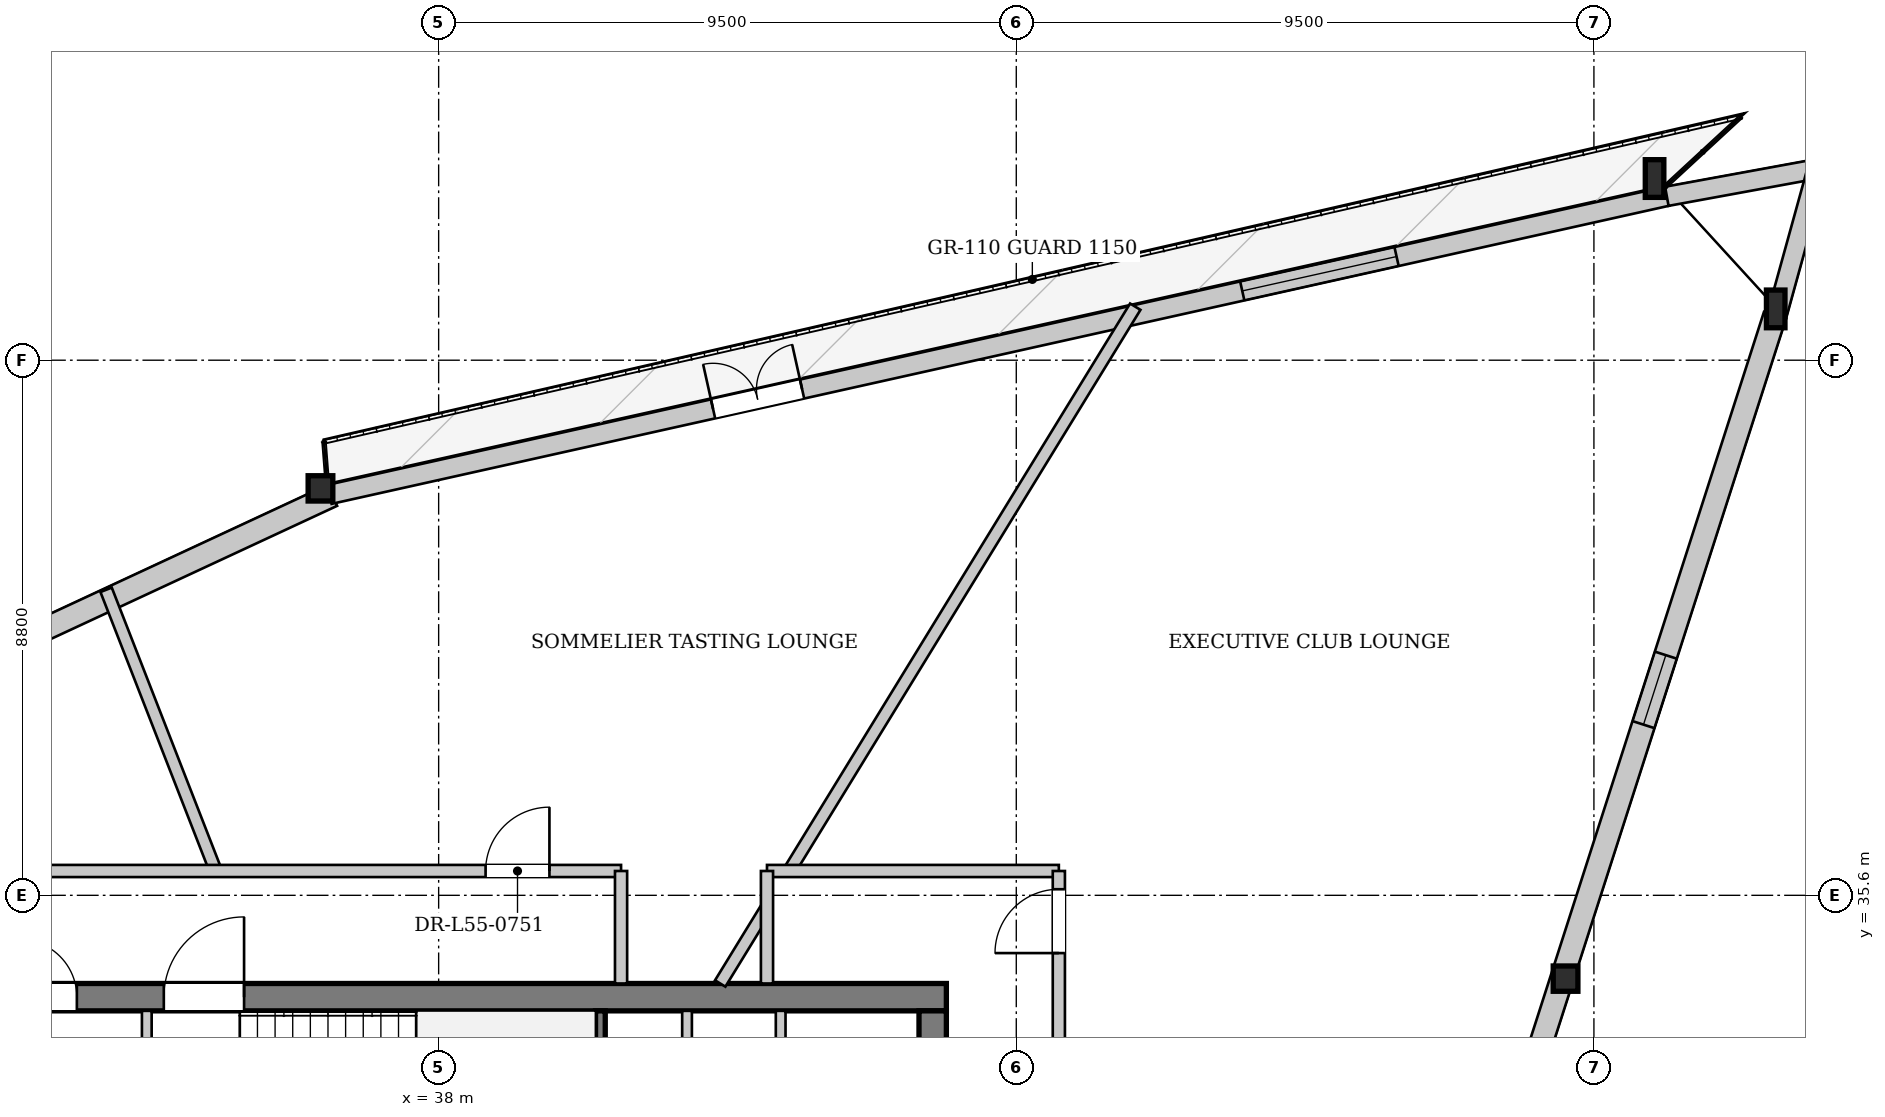
"""IFC4 building model, lengths in metres.
Left out: names, types, materials, properties, quantities, classifications, styles, units other than length and angle.
Written with IfcOpenShell. Run it as: python <this file> out.ifc"""

import sys

from ifc_helpers import new_model, si_unit, direction, frame, frame_2d, origin, origin_2d, place, context, subcontext, project, spatial, rectangle, i_section, extrude, source, transform, mapped, element, fill, save


model = new_model("IFC4")
c1 = context("Model", 3, precision=1e-05, world=origin(), true_north=direction((0.0, 1.0)))
c2 = subcontext(c1, "Body", "Model", "MODEL_VIEW")
j1 = project(units=[si_unit("LENGTHUNIT", "METRE"), si_unit("PLANEANGLEUNIT", "RADIAN")], contexts=[c1])
p1 = place(None, origin())
s1 = spatial("IfcSite", under=j1, at=p1, CompositionType="ELEMENT")
p2 = place(p1, origin())
s2 = spatial("IfcBuilding", under=s1, at=p2, CompositionType="ELEMENT")
p3 = place(p2, frame((0.0, 0.0, 209.6)))
s3 = spatial("IfcBuildingStorey", under=s2, at=p3, CompositionType="ELEMENT", Elevation=209.6)
m1 = source(origin(), c2, "Body", "SweptSolid", [
    extrude(i_section(OverallWidth=0.305, OverallDepth=0.62, WebThickness=0.021, FlangeThickness=0.04, at=origin_2d()), origin(), (0.0, 0.0, 1.0), 3.418),
])
p4 = place(p3, frame((60.159, 45.079, 0.0), z_axis=(-0.098864511312, 0.096292891076, 0.990430960507), x_axis=(-0.69772854898, -0.716362249101, 0.0)))
e1 = element("IfcColumn", 1, at=p4, inside=s3, PredefinedType="COLUMN", context=c2, shape_type="MappedRepresentation", body=[
    mapped(m1, transform((0.0, 0.0, 0.0), x_axis=(1.0, 0.0, 0.0), y_axis=(0.0, 1.0, 0.0), z_axis=(0.0, 0.0, 1.0), scale=1.0)),
])
m2 = source(origin(), c2, "Body", "SweptSolid", [
    extrude(i_section(OverallWidth=0.305, OverallDepth=0.62, WebThickness=0.021, FlangeThickness=0.04, at=origin_2d()), origin(), (0.0, 0.0, 1.0), 3.413),
])
p5 = place(p3, frame((58.17, 47.253, 0.0), z_axis=(-0.101281359539, 0.07903665416, 0.991713312157), x_axis=(-0.615211782312, -0.78836188575, 0.0)))
e2 = element("IfcColumn", 2, at=p5, inside=s3, PredefinedType="COLUMN", context=c2, shape_type="MappedRepresentation", body=[
    mapped(m2, transform((0.0, 0.0, 0.0), x_axis=(1.0, 0.0, 0.0), y_axis=(0.0, 1.0, 0.0), z_axis=(0.0, 0.0, 1.0), scale=1.0)),
])
m3 = source(origin(), c2, "Body", "SweptSolid", [
    extrude(i_section(OverallWidth=0.406, OverallDepth=0.416, WebThickness=0.027, FlangeThickness=0.042, at=origin_2d()), origin(), (0.0, 0.0, 1.0), 3.395),
])
p6 = place(p3, frame((36.17, 42.35, 0.0), z_axis=(-0.06681514078, -0.033803139038, 0.997192601634), x_axis=(0.451434801381, -0.892304107411, 0.0)))
e3 = element("IfcColumn", 3, at=p6, inside=s3, PredefinedType="COLUMN", context=c2, shape_type="MappedRepresentation", body=[
    mapped(m3, transform((0.0, 0.0, 0.0), x_axis=(1.0, 0.0, 0.0), y_axis=(0.0, 1.0, 0.0), z_axis=(0.0, 0.0, 1.0), scale=1.0)),
])
m4 = source(origin(), c2, "Body", "SweptSolid", [
    extrude(i_section(OverallWidth=0.406, OverallDepth=0.416, WebThickness=0.027, FlangeThickness=0.042, at=origin_2d()), origin(), (0.0, 0.0, 1.0), 3.403),
])
p7 = place(p3, frame((56.625, 34.082, 0.0), z_axis=(-0.053880341029, 0.087098181103, 0.994741582372), x_axis=(-0.85042932519, -0.526089310723, 0.0)))
e4 = element("IfcColumn", 4, at=p7, inside=s3, PredefinedType="COLUMN", context=c2, shape_type="MappedRepresentation", body=[
    mapped(m4, transform((0.0, 0.0, 0.0), x_axis=(1.0, 0.0, 0.0), y_axis=(0.0, 1.0, 0.0), z_axis=(0.0, 0.0, 1.0), scale=1.0)),
])
p8 = place(p3, frame((15.812, 32.672, 0.0), z_axis=(0.0, 0.0, 1.0), x_axis=(0.906732766682, 0.421705691003, 0.0)))
e5 = element("IfcWall", 5, at=p8, inside=s3, PredefinedType="SOLIDWALL", context=c2, shape_type="SweptSolid", body=[
    extrude(rectangle(XDim=22.54, YDim=0.38, at=frame_2d((11.27, 0.0))), origin(), (0.0, 0.0, 1.0), 2.822),
])
p9 = place(p8, frame((5.711, 0.0, 0.65)))
e6 = element("IfcOpeningElement", 6, at=p9, cuts=e5, PredefinedType="OPENING", context=c2, shape_type="SweptSolid", body=[
    extrude(rectangle(XDim=1.2, YDim=1.5, at=frame_2d((0.6, 0.75))), frame((0.0, 0.2, 0.0), z_axis=(0.0, -1.0, 0.0), x_axis=(1.0, 0.0, 0.0)), (0.0, 0.0, 1.0), 0.4),
])
p10 = place(p8, frame((15.629, 0.0, 0.65)))
e7 = element("IfcOpeningElement", 7, at=p10, cuts=e5, PredefinedType="OPENING", context=c2, shape_type="SweptSolid", body=[
    extrude(rectangle(XDim=1.2, YDim=1.5, at=frame_2d((0.6, 0.75))), frame((0.0, 0.2, 0.0), z_axis=(0.0, -1.0, 0.0), x_axis=(1.0, 0.0, 0.0)), (0.0, 0.0, 1.0), 0.4),
])
p11 = place(p3, frame((36.205, 42.193, 0.0), z_axis=(0.0, 0.0, 1.0), x_axis=(0.976051796761, 0.217538249599, 0.0)))
e8 = element("IfcWall", 8, at=p11, inside=s3, PredefinedType="SOLIDWALL", context=c2, shape_type="SweptSolid", body=[
    extrude(rectangle(XDim=22.54, YDim=0.32, at=frame_2d((11.27, 0.0))), origin(), (0.0, 0.0, 1.0), 2.822),
])
p12 = place(p11, frame((6.463, 0.0, 0.0)))
e9 = element("IfcOpeningElement", 9, at=p12, cuts=e8, PredefinedType="OPENING", context=c2, shape_type="SweptSolid", body=[
    extrude(rectangle(XDim=1.5, YDim=2.3, at=frame_2d((0.75, 1.15))), frame((0.0, 0.17, 0.0), z_axis=(0.0, -1.0, 0.0), x_axis=(1.0, 0.0, 0.0)), (0.0, 0.0, 1.0), 0.34),
])
p13 = place(p11, frame((15.38, 0.0, 0.352)))
e10 = element("IfcOpeningElement", 10, at=p13, cuts=e8, PredefinedType="OPENING", context=c2, shape_type="SweptSolid", body=[
    extrude(rectangle(XDim=2.6, YDim=2.35, at=frame_2d((1.3, 1.175))), frame((0.0, 0.17, 0.0), z_axis=(0.0, -1.0, 0.0), x_axis=(1.0, 0.0, 0.0)), (0.0, 0.0, 1.0), 0.34),
])
for number, where, z_axis, x_axis in (
    (11, (58.199, 47.096, 0.0), (0.0, 0.0, 1.0), (0.984, 0.18, 0.0)),
    (12, (60.744, 47.795, 0.0), (0.0, 0.0, 1.0), (-0.267, -0.964, 0.0)),
):
    element("IfcWall", number, at=place(p3, frame(where, z_axis=z_axis, x_axis=x_axis)), inside=s3, PredefinedType="SOLIDWALL", context=c2, shape_type="SweptSolid", body=[
        extrude(rectangle(XDim=2.774, YDim=0.32, at=frame_2d((1.387, 0.0))), origin(), (0.0, 0.0, 1.0), 2.822),
    ])
p14 = place(p3, frame((59.978, 45.137, 0.0), z_axis=(0.0, 0.0, 1.0), x_axis=(-0.305908606636, -0.95206088271, 0.0)))
e13 = element("IfcWall", 13, at=p14, inside=s3, PredefinedType="SOLIDWALL", context=c2, shape_type="SweptSolid", body=[
    extrude(rectangle(XDim=23.102, YDim=0.38, at=frame_2d((11.551, 0.0))), origin(), (0.0, 0.0, 1.0), 2.822),
])
p15 = place(p14, frame((5.869, 0.0, 0.65)))
e14 = element("IfcOpeningElement", 14, at=p15, cuts=e13, PredefinedType="OPENING", context=c2, shape_type="SweptSolid", body=[
    extrude(rectangle(XDim=1.2, YDim=1.5, at=frame_2d((0.6, 0.75))), frame((0.0, 0.2, 0.0), z_axis=(0.0, -1.0, 0.0), x_axis=(1.0, 0.0, 0.0)), (0.0, 0.0, 1.0), 0.4),
])
p16 = place(p14, frame((16.034, 0.0, 0.65)))
e15 = element("IfcOpeningElement", 15, at=p16, cuts=e13, PredefinedType="OPENING", context=c2, shape_type="SweptSolid", body=[
    extrude(rectangle(XDim=1.2, YDim=1.5, at=frame_2d((0.6, 0.75))), frame((0.0, 0.2, 0.0), z_axis=(0.0, -1.0, 0.0), x_axis=(1.0, 0.0, 0.0)), (0.0, 0.0, 1.0), 0.4),
])
p17 = place(p3, frame((29.65, 33.925, 0.0), z_axis=(0.0, 0.0, 1.0), x_axis=(1.0, 0.0, 0.0)))
e16 = element("IfcWall", 16, at=p17, inside=s3, PredefinedType="SHEAR", context=c2, shape_type="SweptSolid", body=[
    extrude(rectangle(XDim=16.7, YDim=0.45, at=frame_2d((8.35, 0.0))), origin(), (0.0, 0.0, 1.0), 3.33),
])
p18 = place(p17, frame((1.45, 0.0, 0.0)))
e17 = element("IfcOpeningElement", 17, at=p18, cuts=e16, PredefinedType="OPENING", context=c2, shape_type="SweptSolid", body=[
    extrude(rectangle(XDim=0.95, YDim=2.1, at=frame_2d((0.475, 1.05))), frame((0.0, 0.235, 0.0), z_axis=(0.0, -1.0, 0.0), x_axis=(1.0, 0.0, 0.0)), (0.0, 0.0, 1.0), 0.47),
])
p19 = place(p17, frame((3.83, 0.0, 0.0)))
e18 = element("IfcOpeningElement", 18, at=p19, cuts=e16, PredefinedType="OPENING", context=c2, shape_type="SweptSolid", body=[
    extrude(rectangle(XDim=1.32, YDim=2.2, at=frame_2d((0.66, 1.1))), frame((0.0, 0.235, 0.0), z_axis=(0.0, -1.0, 0.0), x_axis=(1.0, 0.0, 0.0)), (0.0, 0.0, 1.0), 0.47),
])
p20 = place(p3, frame((46.125, 33.7, 0.0), z_axis=(0.0, 0.0, 1.0), x_axis=(0.0, -1.0, 0.0)))
e19 = element("IfcWall", 19, at=p20, inside=s3, PredefinedType="SHEAR", context=c2, shape_type="SweptSolid", body=[
    extrude(rectangle(XDim=14.2, YDim=0.45, at=frame_2d((7.1, 0.0))), origin(), (0.0, 0.0, 1.0), 3.33),
])
p21 = place(p20, frame((5.18, 0.0, 0.0)))
e20 = element("IfcOpeningElement", 20, at=p21, cuts=e19, PredefinedType="OPENING", context=c2, shape_type="SweptSolid", body=[
    extrude(rectangle(XDim=1.6, YDim=2.2, at=frame_2d((0.8, 1.1))), frame((0.0, 0.235, 0.0), z_axis=(0.0, -1.0, 0.0), x_axis=(1.0, 0.0, 0.0)), (0.0, 0.0, 1.0), 0.47),
])
p22 = place(p20, frame((2.05, 0.0, 0.0)))
e21 = element("IfcOpeningElement", 21, at=p22, cuts=e19, PredefinedType="OPENING", context=c2, shape_type="SweptSolid", body=[
    extrude(rectangle(XDim=0.95, YDim=2.1, at=frame_2d((0.475, 1.05))), frame((0.0, 0.235, 0.0), z_axis=(0.0, -1.0, 0.0), x_axis=(1.0, 0.0, 0.0)), (0.0, 0.0, 1.0), 0.47),
])
p23 = place(p3, frame((40.66, 30.6, 0.0), z_axis=(0.0, 0.0, 1.0), x_axis=(0.0, 1.0, 0.0)))
e22 = element("IfcWall", 22, at=p23, inside=s3, PredefinedType="PARTITIONING", context=c2, shape_type="SweptSolid", body=[
    extrude(rectangle(XDim=3.1, YDim=0.16, at=frame_2d((1.55, 0.0))), origin(), (0.0, 0.0, 1.0), 3.33),
])
p24 = place(p3, frame((33.2, 28.44, 0.0), z_axis=(0.0, 0.0, 1.0), x_axis=(0.0, 1.0, 0.0)))
e23 = element("IfcWall", 23, at=p24, inside=s3, PredefinedType="PARTITIONING", context=c2, shape_type="SweptSolid", body=[
    extrude(rectangle(XDim=5.26, YDim=0.16, at=frame_2d((2.63, 0.0))), origin(), (0.0, 0.0, 1.0), 3.33),
])
p25 = place(p3, frame((42.085, 30.68, 0.0), z_axis=(0.0, 0.0, 1.0), x_axis=(0.0, 1.0, 0.0)))
e24 = element("IfcWall", 24, at=p25, inside=s3, PredefinedType="PARTITIONING", context=c2, shape_type="SweptSolid", body=[
    extrude(rectangle(XDim=3.02, YDim=0.16, at=frame_2d((1.51, 0.0))), origin(), (0.0, 0.0, 1.0), 3.33),
])
p26 = place(p25, frame((0.95, 0.0, 0.0)))
e25 = element("IfcOpeningElement", 25, at=p26, cuts=e24, PredefinedType="OPENING", context=c2, shape_type="SweptSolid", body=[
    extrude(rectangle(XDim=0.95, YDim=2.1, at=frame_2d((0.475, 1.05))), frame((0.0, 0.09, 0.0), z_axis=(0.0, -1.0, 0.0), x_axis=(1.0, 0.0, 0.0)), (0.0, 0.0, 1.0), 0.18),
])
p27 = place(p3, frame((43.625, 30.68, 0.0), z_axis=(0.0, 0.0, 1.0), x_axis=(0.0, 1.0, 0.0)))
e26 = element("IfcWall", 26, at=p27, inside=s3, PredefinedType="PARTITIONING", context=c2, shape_type="SweptSolid", body=[
    extrude(rectangle(XDim=3.02, YDim=0.16, at=frame_2d((1.51, 0.0))), origin(), (0.0, 0.0, 1.0), 3.33),
])
p28 = place(p27, frame((0.95, 0.0, 0.0)))
e27 = element("IfcOpeningElement", 27, at=p28, cuts=e26, PredefinedType="OPENING", context=c2, shape_type="SweptSolid", body=[
    extrude(rectangle(XDim=0.95, YDim=2.1, at=frame_2d((0.475, 1.05))), frame((0.0, 0.09, 0.0), z_axis=(0.0, -1.0, 0.0), x_axis=(1.0, 0.0, 0.0)), (0.0, 0.0, 1.0), 0.18),
])
p29 = place(p3, frame((42.631, 34.15, 0.0), z_axis=(0.0, 0.0, 1.0), x_axis=(0.522717649011, 0.852505870603, 0.0)))
e28 = element("IfcWall", 28, at=p29, inside=s3, PredefinedType="PARTITIONING", context=c2, shape_type="SweptSolid", body=[
    extrude(rectangle(XDim=1.472, YDim=0.2, at=frame_2d((0.736, 0.0))), origin(), (0.0, 0.0, 1.0), 3.33),
])
p30 = place(p3, frame((43.765, 36.0, 0.0), z_axis=(0.0, 0.0, 1.0), x_axis=(0.522828119017, 0.852438125593, 0.0)))
e29 = element("IfcWall", 29, at=p30, inside=s3, PredefinedType="PARTITIONING", context=c2, shape_type="SweptSolid", body=[
    extrude(rectangle(XDim=10.887, YDim=0.2, at=frame_2d((5.443, 0.0))), origin(), (0.0, 0.0, 1.0), 3.33),
])
p31 = place(p3, frame((34.334, 36.0, 0.0), z_axis=(0.0, 0.0, 1.0), x_axis=(-0.363319658623, 0.93166454567, 0.0)))
e30 = element("IfcWall", 30, at=p31, inside=s3, PredefinedType="PARTITIONING", context=c2, shape_type="SweptSolid", body=[
    extrude(rectangle(XDim=4.963, YDim=0.2, at=frame_2d((2.481, 0.0))), origin(), (0.0, 0.0, 1.0), 3.33),
])
p32 = place(p3, frame((27.8, 36.0, 0.0), z_axis=(0.0, 0.0, 1.0), x_axis=(1.0, 0.0, 0.0)))
e31 = element("IfcWall", 31, at=p32, inside=s3, PredefinedType="PARTITIONING", context=c2, shape_type="SweptSolid", body=[
    extrude(rectangle(XDim=13.2, YDim=0.2, at=frame_2d((6.6, 0.0))), origin(), (0.0, 0.0, 1.0), 3.33),
])
p33 = place(p32, frame((10.972, 0.0, 0.0)))
e32 = element("IfcOpeningElement", 32, at=p33, cuts=e31, PredefinedType="OPENING", context=c2, shape_type="SweptSolid", body=[
    extrude(rectangle(XDim=1.05, YDim=2.2, at=frame_2d((0.525, 1.1))), frame((0.0, 0.11, 0.0), z_axis=(0.0, -1.0, 0.0), x_axis=(1.0, 0.0, 0.0)), (0.0, 0.0, 1.0), 0.22),
])
p34 = place(p32, frame((0.3, 0.0, 0.0)))
e33 = element("IfcOpeningElement", 33, at=p34, cuts=e31, PredefinedType="OPENING", context=c2, shape_type="SweptSolid", body=[
    extrude(rectangle(XDim=1.05, YDim=2.2, at=frame_2d((0.525, 1.1))), frame((0.0, 0.11, 0.0), z_axis=(0.0, -1.0, 0.0), x_axis=(1.0, 0.0, 0.0)), (0.0, 0.0, 1.0), 0.22),
])
p35 = place(p3, frame((41.0, 34.15, 0.0), z_axis=(0.0, 0.0, 1.0), x_axis=(0.0, 1.0, 0.0)))
e34 = element("IfcWall", 34, at=p35, inside=s3, PredefinedType="PARTITIONING", context=c2, shape_type="SweptSolid", body=[
    extrude(rectangle(XDim=1.85, YDim=0.2, at=frame_2d((0.925, 0.0))), origin(), (0.0, 0.0, 1.0), 3.33),
])
p36 = place(p3, frame((43.4, 36.0, 0.0), z_axis=(0.0, 0.0, 1.0), x_axis=(1.0, 0.0, 0.0)))
e35 = element("IfcWall", 35, at=p36, inside=s3, PredefinedType="PARTITIONING", context=c2, shape_type="SweptSolid", body=[
    extrude(rectangle(XDim=4.8, YDim=0.2, at=frame_2d((2.4, 0.0))), origin(), (0.0, 0.0, 1.0), 3.33),
])
p37 = place(p3, frame((43.4, 34.15, 0.0), z_axis=(0.0, 0.0, 1.0), x_axis=(0.0, 1.0, 0.0)))
e36 = element("IfcWall", 36, at=p37, inside=s3, PredefinedType="PARTITIONING", context=c2, shape_type="SweptSolid", body=[
    extrude(rectangle(XDim=1.85, YDim=0.2, at=frame_2d((0.925, 0.0))), origin(), (0.0, 0.0, 1.0), 3.33),
])
p38 = place(p3, frame((48.2, 17.2, 0.0), z_axis=(0.0, 0.0, 1.0), x_axis=(0.0, 1.0, 0.0)))
e37 = element("IfcWall", 37, at=p38, inside=s3, PredefinedType="PARTITIONING", context=c2, shape_type="SweptSolid", body=[
    extrude(rectangle(XDim=18.8, YDim=0.2, at=frame_2d((9.4, 0.0))), origin(), (0.0, 0.0, 1.0), 3.33),
])
p39 = place(p38, frame((17.45, 0.0, 0.0)))
e38 = element("IfcOpeningElement", 38, at=p39, cuts=e37, PredefinedType="OPENING", context=c2, shape_type="SweptSolid", body=[
    extrude(rectangle(XDim=1.05, YDim=2.2, at=frame_2d((0.525, 1.1))), frame((0.0, 0.11, 0.0), z_axis=(0.0, -1.0, 0.0), x_axis=(1.0, 0.0, 0.0)), (0.0, 0.0, 1.0), 0.22),
])
m5 = source(origin(), c2, "Body", "SweptSolid", [
    extrude(rectangle(XDim=1.5, YDim=2.3, at=frame_2d((0.75, 1.15))), frame((0.0, 0.025, 0.0), z_axis=(0.0, -1.0, 0.0), x_axis=(1.0, 0.0, 0.0)), (0.0, 0.0, 1.0), 0.05),
])
p40 = place(p12, origin())
e39 = element("IfcDoor", 39, at=p40, inside=s3, OperationType="DOUBLE_DOOR_SINGLE_SWING", PredefinedType="DOOR", context=c2, shape_type="MappedRepresentation", body=[
    mapped(m5, transform((0.0, 0.0, 0.0), x_axis=(1.0, 0.0, 0.0), y_axis=(0.0, 1.0, 0.0), z_axis=(0.0, 0.0, 1.0), scale=1.0)),
])
fill(e9, e39)
m6 = source(origin(), c2, "Body", "SweptSolid", [
    extrude(rectangle(XDim=2.6, YDim=2.35, at=frame_2d((1.3, 1.175))), frame((0.0, 0.03, 0.0), z_axis=(0.0, -1.0, 0.0), x_axis=(1.0, 0.0, 0.0)), (0.0, 0.0, 1.0), 0.06),
])
p41 = place(p13, origin())
e40 = element("IfcWindow", 40, at=p41, inside=s3, PartitioningType="SINGLE_PANEL", PredefinedType="WINDOW", context=c2, shape_type="MappedRepresentation", body=[
    mapped(m6, transform((0.0, 0.0, 0.0), x_axis=(1.0, 0.0, 0.0), y_axis=(0.0, 1.0, 0.0), z_axis=(0.0, 0.0, 1.0), scale=1.0)),
])
fill(e10, e40)
m7 = source(origin(), c2, "Body", "SweptSolid", [
    extrude(rectangle(XDim=1.2, YDim=1.5, at=frame_2d((0.6, 0.75))), frame((0.0, 0.03, 0.0), z_axis=(0.0, -1.0, 0.0), x_axis=(1.0, 0.0, 0.0)), (0.0, 0.0, 1.0), 0.06),
])
p42 = place(p15, origin())
e41 = element("IfcWindow", 41, at=p42, inside=s3, PartitioningType="SINGLE_PANEL", PredefinedType="WINDOW", context=c2, shape_type="MappedRepresentation", body=[
    mapped(m7, transform((0.0, 0.0, 0.0), x_axis=(1.0, 0.0, 0.0), y_axis=(0.0, 1.0, 0.0), z_axis=(0.0, 0.0, 1.0), scale=1.0)),
])
fill(e14, e41)
m8 = source(origin(), c2, "Body", "SweptSolid", [
    extrude(rectangle(XDim=0.95, YDim=2.1, at=frame_2d((0.475, 1.05))), frame((0.0, 0.025, 0.0), z_axis=(0.0, -1.0, 0.0), x_axis=(1.0, 0.0, 0.0)), (0.0, 0.0, 1.0), 0.05),
])
p43 = place(p18, origin())
e42 = element("IfcDoor", 42, at=p43, inside=s3, OperationType="SINGLE_SWING_LEFT", PredefinedType="DOOR", context=c2, shape_type="MappedRepresentation", body=[
    mapped(m8, transform((0.0, 0.0, 0.0), x_axis=(1.0, 0.0, 0.0), y_axis=(0.0, 1.0, 0.0), z_axis=(0.0, 0.0, 1.0), scale=1.0)),
])
fill(e17, e42)
m9 = source(origin(), c2, "Body", "SweptSolid", [
    extrude(rectangle(XDim=1.32, YDim=2.2, at=frame_2d((0.66, 1.1))), frame((0.0, 0.025, 0.0), z_axis=(0.0, -1.0, 0.0), x_axis=(1.0, 0.0, 0.0)), (0.0, 0.0, 1.0), 0.05),
])
p44 = place(p19, origin())
e43 = element("IfcDoor", 43, at=p44, inside=s3, OperationType="SINGLE_SWING_RIGHT", PredefinedType="DOOR", context=c2, shape_type="MappedRepresentation", body=[
    mapped(m9, transform((0.0, 0.0, 0.0), x_axis=(1.0, 0.0, 0.0), y_axis=(0.0, 1.0, 0.0), z_axis=(0.0, 0.0, 1.0), scale=1.0)),
])
fill(e18, e43)
m10 = source(origin(), c2, "Body", "SweptSolid", [
    extrude(rectangle(XDim=1.05, YDim=2.2, at=frame_2d((0.525, 1.1))), frame((0.0, 0.025, 0.0), z_axis=(0.0, -1.0, 0.0), x_axis=(1.0, 0.0, 0.0)), (0.0, 0.0, 1.0), 0.05),
])
p45 = place(p33, origin())
e44 = element("IfcDoor", 44, at=p45, inside=s3, OperationType="SINGLE_SWING_RIGHT", PredefinedType="DOOR", context=c2, shape_type="MappedRepresentation", body=[
    mapped(m10, transform((0.0, 0.0, 0.0), x_axis=(1.0, 0.0, 0.0), y_axis=(0.0, 1.0, 0.0), z_axis=(0.0, 0.0, 1.0), scale=1.0)),
])
fill(e32, e44)
p46 = place(p39, origin())
e45 = element("IfcDoor", 45, at=p46, inside=s3, OperationType="SINGLE_SWING_LEFT", PredefinedType="DOOR", context=c2, shape_type="MappedRepresentation", body=[
    mapped(m10, transform((0.0, 0.0, 0.0), x_axis=(1.0, 0.0, 0.0), y_axis=(0.0, 1.0, 0.0), z_axis=(0.0, 0.0, 1.0), scale=1.0)),
])
fill(e38, e45)
save(model, sys.argv[1])
